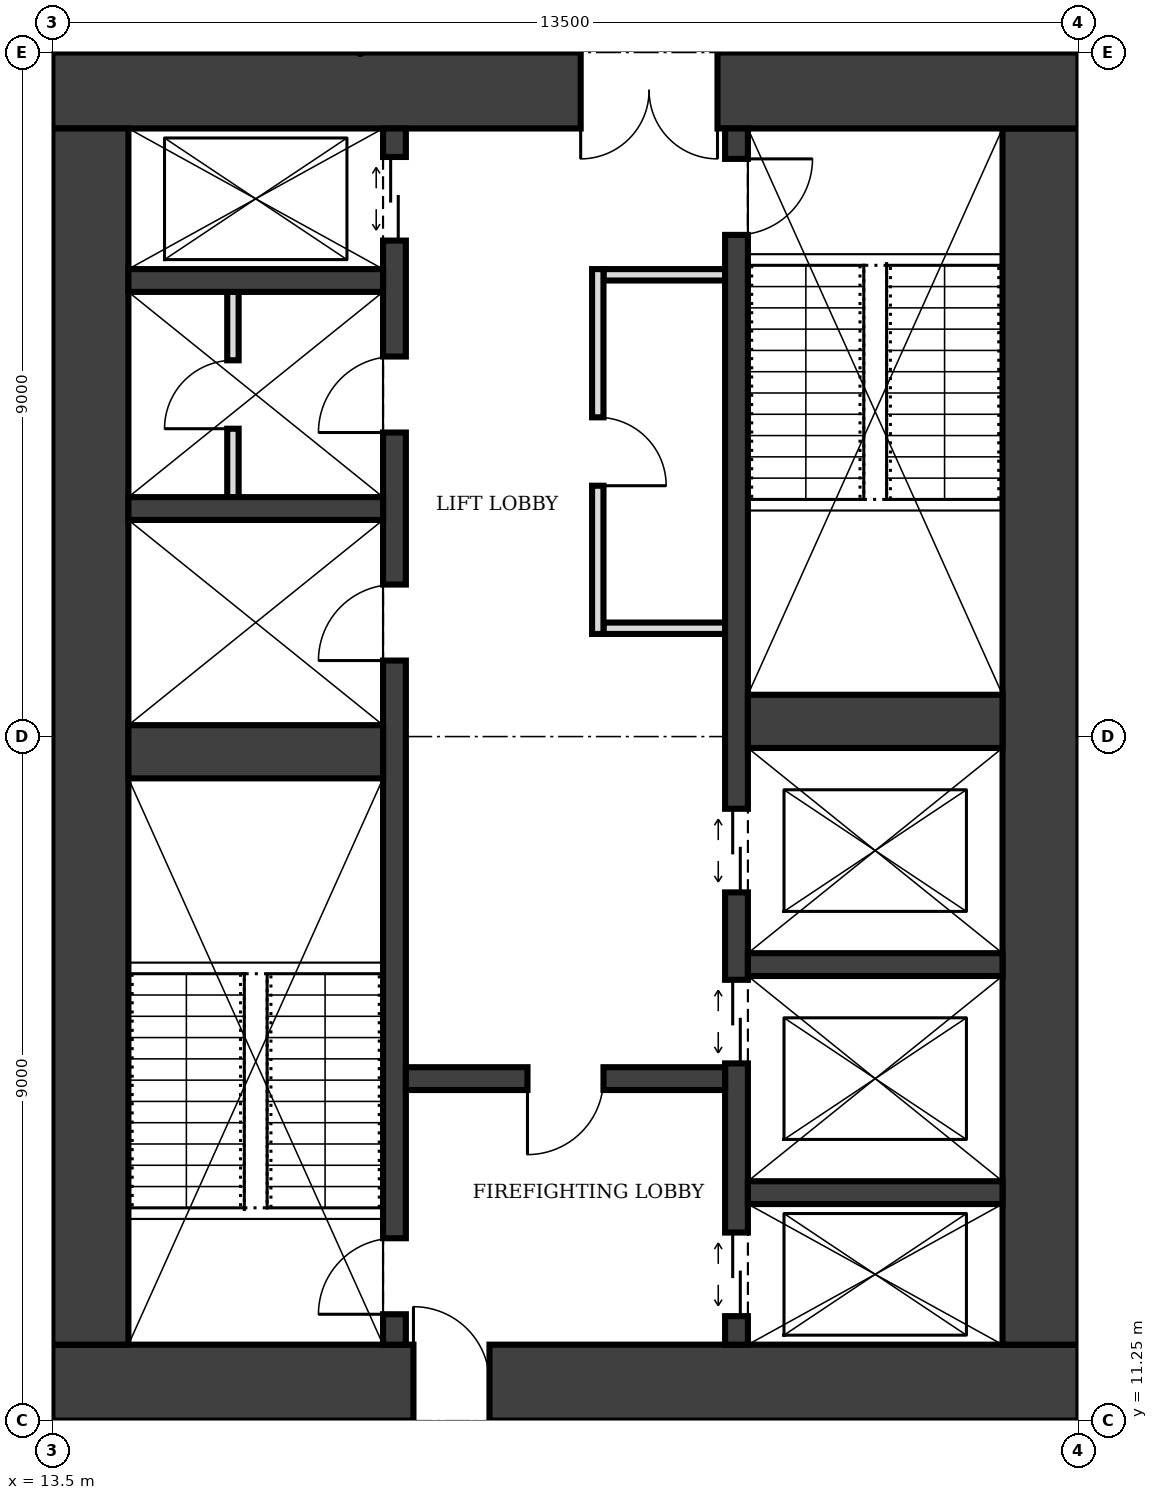
"""IFC4 building model, lengths in metres.
Left out: names, types, materials, properties, quantities, classifications, styles, units other than length and angle.
Written with IfcOpenShell. Run it as: python <this file> out.ifc"""

import sys

from ifc_helpers import new_model, si_unit, direction, frame, frame_2d, origin, place, context, subcontext, project, spatial, rectangle, extrude, element, fill, save


model = new_model("IFC4")
c1 = context("Model", 3, precision=1e-05, world=origin(), true_north=direction((0.0, 1.0)))
c2 = subcontext(c1, "Body", "Model", "MODEL_VIEW")
j1 = project(units=[si_unit("LENGTHUNIT", "METRE"), si_unit("PLANEANGLEUNIT", "RADIAN")], contexts=[c1])
p1 = place(None, origin())
s1 = spatial("IfcSite", under=j1, at=p1, CompositionType="ELEMENT")
p2 = place(p1, origin())
s2 = spatial("IfcBuilding", under=s1, at=p2, CompositionType="ELEMENT")
p3 = place(p2, frame((0.0, 0.0, 281.0)))
s3 = spatial("IfcBuildingStorey", under=s2, at=p3, CompositionType="ELEMENT", Elevation=281.0)
p4 = place(p3, frame((13.5, 11.75, 0.0), z_axis=(0.0, 0.0, 1.0), x_axis=(1.0, 0.0, 0.0)))
e1 = element("IfcWall", 1, at=p4, inside=s3, PredefinedType="SHEAR", context=c2, shape_type="SweptSolid", body=[
    extrude(rectangle(XDim=13.5, YDim=1.0, at=frame_2d((6.75, 0.0))), origin(), (0.0, 0.0, 1.0), 4.0),
])
p5 = place(p4, frame((4.75, 0.0, 0.0)))
e2 = element("IfcOpeningElement", 2, at=p5, cuts=e1, PredefinedType="OPENING", context=c2, shape_type="SweptSolid", body=[
    extrude(rectangle(XDim=1.0, YDim=2.1, at=frame_2d((0.5, 1.05))), frame((0.0, 0.51, 0.0), z_axis=(0.0, -1.0, 0.0), x_axis=(1.0, 0.0, 0.0)), (0.0, 0.0, 1.0), 1.02),
])
p6 = place(p3, frame((26.5, 12.25, 0.0), z_axis=(0.0, 0.0, 1.0), x_axis=(0.0, 1.0, 0.0)))
e3 = element("IfcWall", 3, at=p6, inside=s3, PredefinedType="SHEAR", context=c2, shape_type="SweptSolid", body=[
    extrude(rectangle(XDim=16.0, YDim=1.0, at=frame_2d((8.0, 0.0))), origin(), (0.0, 0.0, 1.0), 4.0),
])
p7 = place(p3, frame((27.0, 28.75, 0.0), z_axis=(0.0, 0.0, 1.0), x_axis=(-1.0, 0.0, 0.0)))
e4 = element("IfcWall", 4, at=p7, inside=s3, PredefinedType="SHEAR", context=c2, shape_type="SweptSolid", body=[
    extrude(rectangle(XDim=13.5, YDim=1.0, at=frame_2d((6.75, 0.0))), origin(), (0.0, 0.0, 1.0), 4.0),
])
p8 = place(p7, frame((4.75, 0.0, 0.0)))
e5 = element("IfcOpeningElement", 5, at=p8, cuts=e4, PredefinedType="OPENING", context=c2, shape_type="SweptSolid", body=[
    extrude(rectangle(XDim=1.8, YDim=2.1, at=frame_2d((0.9, 1.05))), frame((0.0, 0.51, 0.0), z_axis=(0.0, -1.0, 0.0), x_axis=(1.0, 0.0, 0.0)), (0.0, 0.0, 1.0), 1.02),
])
p9 = place(p3, frame((14.0, 28.25, 0.0), z_axis=(0.0, 0.0, 1.0), x_axis=(0.0, -1.0, 0.0)))
e6 = element("IfcWall", 6, at=p9, inside=s3, PredefinedType="SHEAR", context=c2, shape_type="SweptSolid", body=[
    extrude(rectangle(XDim=16.0, YDim=1.0, at=frame_2d((8.0, 0.0))), origin(), (0.0, 0.0, 1.0), 4.0),
])
p10 = place(p3, frame((18.0, 12.25, 0.0), z_axis=(0.0, 0.0, 1.0), x_axis=(0.0, 1.0, 0.0)))
e7 = element("IfcWall", 7, at=p10, inside=s3, PredefinedType="SHEAR", context=c2, shape_type="SweptSolid", body=[
    extrude(rectangle(XDim=16.0, YDim=0.3, at=frame_2d((8.0, 0.0))), origin(), (0.0, 0.0, 1.0), 4.0),
])
p11 = place(p10, frame((0.4, 0.0, 0.0)))
e8 = element("IfcOpeningElement", 8, at=p11, cuts=e7, PredefinedType="OPENING", context=c2, shape_type="SweptSolid", body=[
    extrude(rectangle(XDim=1.0, YDim=2.1, at=frame_2d((0.5, 1.05))), frame((0.0, 0.16, 0.0), z_axis=(0.0, -1.0, 0.0), x_axis=(1.0, 0.0, 0.0)), (0.0, 0.0, 1.0), 0.32),
])
p12 = place(p10, frame((14.525, 0.0, 0.0)))
e9 = element("IfcOpeningElement", 9, at=p12, cuts=e7, PredefinedType="OPENING", context=c2, shape_type="SweptSolid", body=[
    extrude(rectangle(XDim=1.1, YDim=2.1, at=frame_2d((0.55, 1.05))), frame((0.0, 0.16, 0.0), z_axis=(0.0, -1.0, 0.0), x_axis=(1.0, 0.0, 0.0)), (0.0, 0.0, 1.0), 0.32),
])
p13 = place(p10, frame((9.0, 0.0, 0.0)))
e10 = element("IfcOpeningElement", 10, at=p13, cuts=e7, PredefinedType="OPENING", context=c2, shape_type="SweptSolid", body=[
    extrude(rectangle(XDim=1.0, YDim=2.1, at=frame_2d((0.5, 1.05))), frame((0.0, 0.16, 0.0), z_axis=(0.0, -1.0, 0.0), x_axis=(1.0, 0.0, 0.0)), (0.0, 0.0, 1.0), 0.32),
])
p14 = place(p10, frame((12.0, 0.0, 0.0)))
e11 = element("IfcOpeningElement", 11, at=p14, cuts=e7, PredefinedType="OPENING", context=c2, shape_type="SweptSolid", body=[
    extrude(rectangle(XDim=1.0, YDim=2.1, at=frame_2d((0.5, 1.05))), frame((0.0, 0.16, 0.0), z_axis=(0.0, -1.0, 0.0), x_axis=(1.0, 0.0, 0.0)), (0.0, 0.0, 1.0), 0.32),
])
p15 = place(p3, frame((22.5, 12.25, 0.0), z_axis=(0.0, 0.0, 1.0), x_axis=(0.0, 1.0, 0.0)))
e12 = element("IfcWall", 12, at=p15, inside=s3, PredefinedType="SHEAR", context=c2, shape_type="SweptSolid", body=[
    extrude(rectangle(XDim=16.0, YDim=0.3, at=frame_2d((8.0, 0.0))), origin(), (0.0, 0.0, 1.0), 4.0),
])
p16 = place(p15, frame((14.6, 0.0, 0.0)))
e13 = element("IfcOpeningElement", 13, at=p16, cuts=e12, PredefinedType="OPENING", context=c2, shape_type="SweptSolid", body=[
    extrude(rectangle(XDim=1.0, YDim=2.1, at=frame_2d((0.5, 1.05))), frame((0.0, 0.16, 0.0), z_axis=(0.0, -1.0, 0.0), x_axis=(1.0, 0.0, 0.0)), (0.0, 0.0, 1.0), 0.32),
])
p17 = place(p15, frame((0.375, 0.0, 0.0)))
e14 = element("IfcOpeningElement", 14, at=p17, cuts=e12, PredefinedType="OPENING", context=c2, shape_type="SweptSolid", body=[
    extrude(rectangle(XDim=1.1, YDim=2.1, at=frame_2d((0.55, 1.05))), frame((0.0, 0.16, 0.0), z_axis=(0.0, -1.0, 0.0), x_axis=(1.0, 0.0, 0.0)), (0.0, 0.0, 1.0), 0.32),
])
p18 = place(p15, frame((3.7, 0.0, 0.0)))
e15 = element("IfcOpeningElement", 15, at=p18, cuts=e12, PredefinedType="OPENING", context=c2, shape_type="SweptSolid", body=[
    extrude(rectangle(XDim=1.1, YDim=2.1, at=frame_2d((0.55, 1.05))), frame((0.0, 0.16, 0.0), z_axis=(0.0, -1.0, 0.0), x_axis=(1.0, 0.0, 0.0)), (0.0, 0.0, 1.0), 0.32),
])
p19 = place(p15, frame((5.95, 0.0, 0.0)))
e16 = element("IfcOpeningElement", 16, at=p19, cuts=e12, PredefinedType="OPENING", context=c2, shape_type="SweptSolid", body=[
    extrude(rectangle(XDim=1.1, YDim=2.1, at=frame_2d((0.55, 1.05))), frame((0.0, 0.16, 0.0), z_axis=(0.0, -1.0, 0.0), x_axis=(1.0, 0.0, 0.0)), (0.0, 0.0, 1.0), 0.32),
])
p20 = place(p3, frame((14.5, 20.05, 0.0), z_axis=(0.0, 0.0, 1.0), x_axis=(1.0, 0.0, 0.0)))
e17 = element("IfcWall", 17, at=p20, inside=s3, PredefinedType="SHEAR", context=c2, shape_type="SweptSolid", body=[
    extrude(rectangle(XDim=3.35, YDim=0.7, at=frame_2d((1.675, 0.0))), origin(), (0.0, 0.0, 1.0), 4.0),
])
p21 = place(p3, frame((18.15, 15.75, 0.0), z_axis=(0.0, 0.0, 1.0), x_axis=(1.0, 0.0, 0.0)))
e18 = element("IfcWall", 18, at=p21, inside=s3, PredefinedType="SHEAR", context=c2, shape_type="SweptSolid", body=[
    extrude(rectangle(XDim=4.2, YDim=0.3, at=frame_2d((2.1, 0.0))), origin(), (0.0, 0.0, 1.0), 4.0),
])
p22 = place(p21, frame((1.6, 0.0, 0.0)))
e19 = element("IfcOpeningElement", 19, at=p22, cuts=e18, PredefinedType="OPENING", context=c2, shape_type="SweptSolid", body=[
    extrude(rectangle(XDim=1.0, YDim=2.1, at=frame_2d((0.5, 1.05))), frame((0.0, 0.16, 0.0), z_axis=(0.0, -1.0, 0.0), x_axis=(1.0, 0.0, 0.0)), (0.0, 0.0, 1.0), 0.32),
])
for number, where, z_axis, x_axis in (
    (20, (22.65, 14.25, 0.0), (0.0, 0.0, 1.0), (1.0, 0.0, 0.0)),
    (21, (22.65, 17.25, 0.0), (0.0, 0.0, 1.0), (1.0, 0.0, 0.0)),
):
    element("IfcWall", number, at=place(p3, frame(where, z_axis=z_axis, x_axis=x_axis)), inside=s3, PredefinedType="SHEAR", context=c2, shape_type="SweptSolid", body=[
        extrude(rectangle(XDim=3.35, YDim=0.3, at=frame_2d((1.675, 0.0))), origin(), (0.0, 0.0, 1.0), 4.0),
    ])
p23 = place(p3, frame((22.65, 20.45, 0.0), z_axis=(0.0, 0.0, 1.0), x_axis=(1.0, 0.0, 0.0)))
e22 = element("IfcWall", 22, at=p23, inside=s3, PredefinedType="SHEAR", context=c2, shape_type="SweptSolid", body=[
    extrude(rectangle(XDim=3.35, YDim=0.7, at=frame_2d((1.675, 0.0))), origin(), (0.0, 0.0, 1.0), 4.0),
])
for number, where, z_axis, x_axis in (
    (23, (14.5, 23.25, 0.0), (0.0, 0.0, 1.0), (1.0, 0.0, 0.0)),
    (24, (14.5, 26.25, 0.0), (0.0, 0.0, 1.0), (1.0, 0.0, 0.0)),
):
    element("IfcWall", number, at=place(p3, frame(where, z_axis=z_axis, x_axis=x_axis)), inside=s3, PredefinedType="SHEAR", context=c2, shape_type="SweptSolid", body=[
        extrude(rectangle(XDim=3.35, YDim=0.3, at=frame_2d((1.675, 0.0))), origin(), (0.0, 0.0, 1.0), 4.0),
    ])
p24 = place(p3, frame((20.675, 21.6, 0.0), z_axis=(0.0, 0.0, 1.0), x_axis=(0.0, 1.0, 0.0)))
e25 = element("IfcWall", 25, at=p24, inside=s3, PredefinedType="PARTITIONING", context=c2, shape_type="SweptSolid", body=[
    extrude(rectangle(XDim=4.8, YDim=0.15, at=frame_2d((2.4, 0.0))), origin(), (0.0, 0.0, 1.0), 3.75),
])
p25 = place(p24, frame((1.95, 0.0, 0.0)))
e26 = element("IfcOpeningElement", 26, at=p25, cuts=e25, PredefinedType="OPENING", context=c2, shape_type="SweptSolid", body=[
    extrude(rectangle(XDim=0.9, YDim=2.1, at=frame_2d((0.45, 1.05))), frame((0.0, 0.085, 0.0), z_axis=(0.0, -1.0, 0.0), x_axis=(1.0, 0.0, 0.0)), (0.0, 0.0, 1.0), 0.17),
])
for number, where, z_axis, x_axis in (
    (27, (20.75, 21.675, 0.0), (0.0, 0.0, 1.0), (1.0, 0.0, 0.0)),
    (28, (20.75, 26.325, 0.0), (0.0, 0.0, 1.0), (1.0, 0.0, 0.0)),
):
    element("IfcWall", number, at=place(p3, frame(where, z_axis=z_axis, x_axis=x_axis)), inside=s3, PredefinedType="PARTITIONING", context=c2, shape_type="SweptSolid", body=[
        extrude(rectangle(XDim=1.6, YDim=0.15, at=frame_2d((0.8, 0.0))), origin(), (0.0, 0.0, 1.0), 3.75),
    ])
p26 = place(p3, frame((15.875, 23.4, 0.0), z_axis=(0.0, 0.0, 1.0), x_axis=(0.0, 1.0, 0.0)))
e29 = element("IfcWall", 29, at=p26, inside=s3, PredefinedType="PARTITIONING", context=c2, shape_type="SweptSolid", body=[
    extrude(rectangle(XDim=2.7, YDim=0.15, at=frame_2d((1.35, 0.0))), origin(), (0.0, 0.0, 1.0), 3.75),
])
p27 = place(p26, frame((0.9, 0.0, 0.0)))
e30 = element("IfcOpeningElement", 30, at=p27, cuts=e29, PredefinedType="OPENING", context=c2, shape_type="SweptSolid", body=[
    extrude(rectangle(XDim=0.9, YDim=2.1, at=frame_2d((0.45, 1.05))), frame((0.0, 0.085, 0.0), z_axis=(0.0, -1.0, 0.0), x_axis=(1.0, 0.0, 0.0)), (0.0, 0.0, 1.0), 0.17),
])
p28 = place(p5, origin())
e31 = element("IfcDoor", 31, at=p28, inside=s3, OperationType="SINGLE_SWING_LEFT", PredefinedType="DOOR", context=c2, shape_type="SweptSolid", body=[
    extrude(rectangle(XDim=1.0, YDim=2.1, at=frame_2d((0.5, 1.05))), frame((0.0, 0.025, 0.0), z_axis=(0.0, -1.0, 0.0), x_axis=(1.0, 0.0, 0.0)), (0.0, 0.0, 1.0), 0.05),
])
fill(e2, e31)
p29 = place(p8, origin())
e32 = element("IfcDoor", 32, at=p29, inside=s3, OperationType="DOUBLE_DOOR_SINGLE_SWING", PredefinedType="DOOR", context=c2, shape_type="SweptSolid", body=[
    extrude(rectangle(XDim=1.8, YDim=2.1, at=frame_2d((0.9, 1.05))), frame((0.0, 0.025, 0.0), z_axis=(0.0, -1.0, 0.0), x_axis=(1.0, 0.0, 0.0)), (0.0, 0.0, 1.0), 0.05),
])
fill(e5, e32)
p30 = place(p22, frame((1.0, 0.0, 0.0), z_axis=(0.0, 0.0, 1.0), x_axis=(-1.0, 0.0, 0.0)))
e33 = element("IfcDoor", 33, at=p30, inside=s3, OperationType="SINGLE_SWING_RIGHT", PredefinedType="DOOR", context=c2, shape_type="SweptSolid", body=[
    extrude(rectangle(XDim=1.0, YDim=2.1, at=frame_2d((0.5, 1.05))), frame((0.0, 0.025, 0.0), z_axis=(0.0, -1.0, 0.0), x_axis=(1.0, 0.0, 0.0)), (0.0, 0.0, 1.0), 0.05),
])
fill(e19, e33)
p31 = place(p11, origin())
e34 = element("IfcDoor", 34, at=p31, inside=s3, OperationType="SINGLE_SWING_LEFT", PredefinedType="DOOR", context=c2, shape_type="SweptSolid", body=[
    extrude(rectangle(XDim=1.0, YDim=2.1, at=frame_2d((0.5, 1.05))), frame((0.0, 0.025, 0.0), z_axis=(0.0, -1.0, 0.0), x_axis=(1.0, 0.0, 0.0)), (0.0, 0.0, 1.0), 0.05),
])
fill(e8, e34)
p32 = place(p16, frame((1.0, 0.0, 0.0), z_axis=(0.0, 0.0, 1.0), x_axis=(-1.0, 0.0, 0.0)))
e35 = element("IfcDoor", 35, at=p32, inside=s3, OperationType="SINGLE_SWING_LEFT", PredefinedType="DOOR", context=c2, shape_type="SweptSolid", body=[
    extrude(rectangle(XDim=1.0, YDim=2.1, at=frame_2d((0.5, 1.05))), frame((0.0, 0.025, 0.0), z_axis=(0.0, -1.0, 0.0), x_axis=(1.0, 0.0, 0.0)), (0.0, 0.0, 1.0), 0.05),
])
fill(e13, e35)
p33 = place(p17, origin())
e36 = element("IfcDoor", 36, at=p33, inside=s3, OperationType="DOUBLE_DOOR_SLIDING", PredefinedType="DOOR", context=c2, shape_type="SweptSolid", body=[
    extrude(rectangle(XDim=1.1, YDim=2.1, at=frame_2d((0.55, 1.05))), frame((0.0, 0.025, 0.0), z_axis=(0.0, -1.0, 0.0), x_axis=(1.0, 0.0, 0.0)), (0.0, 0.0, 1.0), 0.05),
])
fill(e14, e36)
p34 = place(p12, origin())
e37 = element("IfcDoor", 37, at=p34, inside=s3, OperationType="DOUBLE_DOOR_SLIDING", PredefinedType="DOOR", context=c2, shape_type="SweptSolid", body=[
    extrude(rectangle(XDim=1.1, YDim=2.1, at=frame_2d((0.55, 1.05))), frame((0.0, 0.025, 0.0), z_axis=(0.0, -1.0, 0.0), x_axis=(1.0, 0.0, 0.0)), (0.0, 0.0, 1.0), 0.05),
])
fill(e9, e37)
p35 = place(p18, origin())
e38 = element("IfcDoor", 38, at=p35, inside=s3, OperationType="DOUBLE_DOOR_SLIDING", PredefinedType="DOOR", context=c2, shape_type="SweptSolid", body=[
    extrude(rectangle(XDim=1.1, YDim=2.1, at=frame_2d((0.55, 1.05))), frame((0.0, 0.025, 0.0), z_axis=(0.0, -1.0, 0.0), x_axis=(1.0, 0.0, 0.0)), (0.0, 0.0, 1.0), 0.05),
])
fill(e15, e38)
p36 = place(p19, origin())
e39 = element("IfcDoor", 39, at=p36, inside=s3, OperationType="DOUBLE_DOOR_SLIDING", PredefinedType="DOOR", context=c2, shape_type="SweptSolid", body=[
    extrude(rectangle(XDim=1.1, YDim=2.1, at=frame_2d((0.55, 1.05))), frame((0.0, 0.025, 0.0), z_axis=(0.0, -1.0, 0.0), x_axis=(1.0, 0.0, 0.0)), (0.0, 0.0, 1.0), 0.05),
])
fill(e16, e39)
p37 = place(p25, frame((0.9, 0.0, 0.0), z_axis=(0.0, 0.0, 1.0), x_axis=(-1.0, 0.0, 0.0)))
e40 = element("IfcDoor", 40, at=p37, inside=s3, OperationType="SINGLE_SWING_RIGHT", PredefinedType="DOOR", context=c2, shape_type="SweptSolid", body=[
    extrude(rectangle(XDim=0.9, YDim=2.1, at=frame_2d((0.45, 1.05))), frame((0.0, 0.025, 0.0), z_axis=(0.0, -1.0, 0.0), x_axis=(1.0, 0.0, 0.0)), (0.0, 0.0, 1.0), 0.05),
])
fill(e26, e40)
p38 = place(p13, origin())
e41 = element("IfcDoor", 41, at=p38, inside=s3, OperationType="SINGLE_SWING_LEFT", PredefinedType="DOOR", context=c2, shape_type="SweptSolid", body=[
    extrude(rectangle(XDim=1.0, YDim=2.1, at=frame_2d((0.5, 1.05))), frame((0.0, 0.025, 0.0), z_axis=(0.0, -1.0, 0.0), x_axis=(1.0, 0.0, 0.0)), (0.0, 0.0, 1.0), 0.05),
])
fill(e10, e41)
p39 = place(p14, origin())
e42 = element("IfcDoor", 42, at=p39, inside=s3, OperationType="SINGLE_SWING_LEFT", PredefinedType="DOOR", context=c2, shape_type="SweptSolid", body=[
    extrude(rectangle(XDim=1.0, YDim=2.1, at=frame_2d((0.5, 1.05))), frame((0.0, 0.025, 0.0), z_axis=(0.0, -1.0, 0.0), x_axis=(1.0, 0.0, 0.0)), (0.0, 0.0, 1.0), 0.05),
])
fill(e11, e42)
p40 = place(p27, origin())
e43 = element("IfcDoor", 43, at=p40, inside=s3, OperationType="SINGLE_SWING_LEFT", PredefinedType="DOOR", context=c2, shape_type="SweptSolid", body=[
    extrude(rectangle(XDim=0.9, YDim=2.1, at=frame_2d((0.45, 1.05))), frame((0.0, 0.025, 0.0), z_axis=(0.0, -1.0, 0.0), x_axis=(1.0, 0.0, 0.0)), (0.0, 0.0, 1.0), 0.05),
])
fill(e30, e43)
save(model, sys.argv[1])
